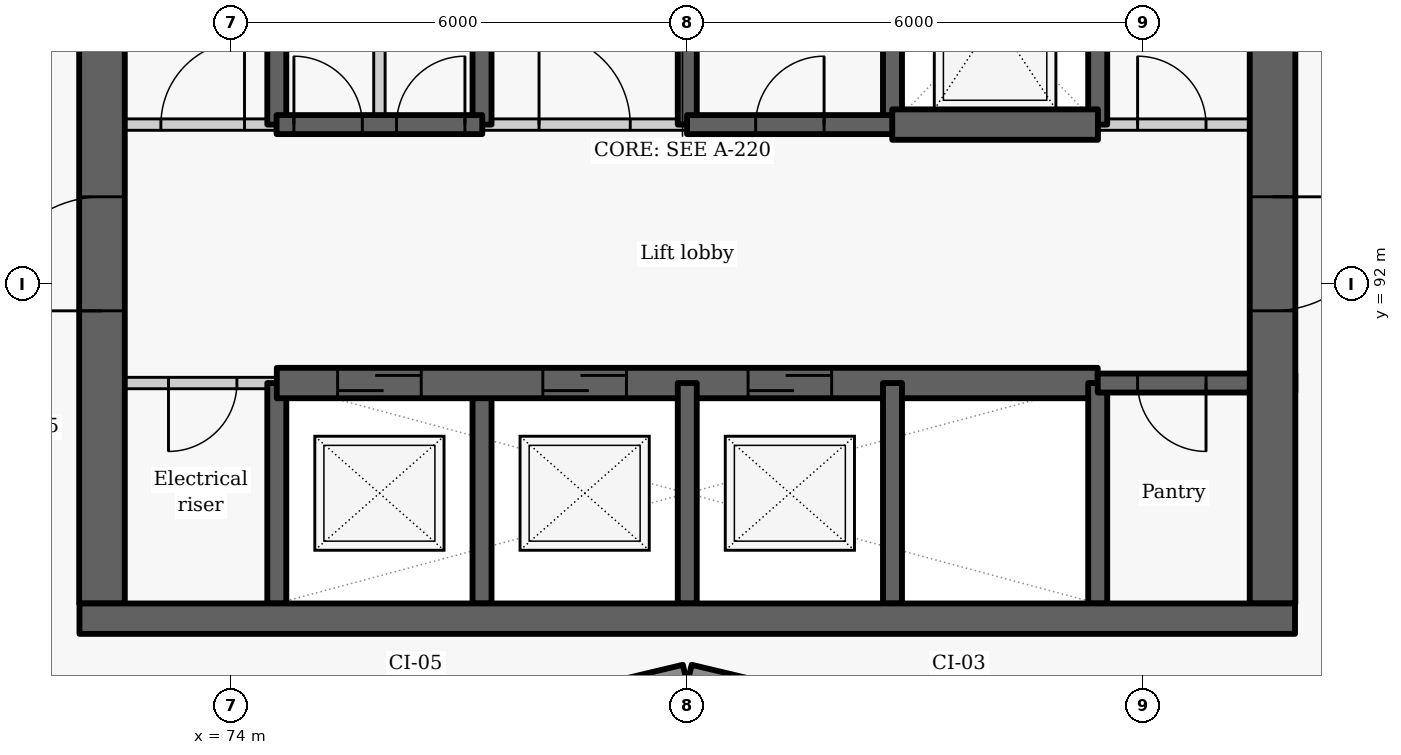
"""IFC4 building model, lengths in metres.
Left out: names, types, materials, properties, quantities, classifications, styles, units other than length and angle.
Written with IfcOpenShell. Run it as: python <this file> out.ifc"""

import sys

from ifc_helpers import new_model, si_unit, direction, frame, frame_2d, origin, place, context, subcontext, project, spatial, rectangle, extrude, element, fill, save


model = new_model("IFC4")
c1 = context("Model", 3, precision=1e-05, world=origin(), true_north=direction((0.0, 1.0)))
c2 = subcontext(c1, "Body", "Model", "MODEL_VIEW")
j1 = project(units=[si_unit("LENGTHUNIT", "METRE"), si_unit("PLANEANGLEUNIT", "RADIAN")], contexts=[c1])
p1 = place(None, origin())
s1 = spatial("IfcSite", under=j1, at=p1, CompositionType="ELEMENT")
p2 = place(p1, origin())
s2 = spatial("IfcBuilding", under=s1, at=p2, CompositionType="ELEMENT")
p3 = place(p2, frame((0.0, 0.0, 107.4)))
s3 = spatial("IfcBuildingStorey", under=s2, at=p3, CompositionType="ELEMENT", Elevation=107.4)
for number, where, z_axis, x_axis in (
    (1, (76.814, 86.119, 0.0), (0.0, 0.0, 1.0), (0.973, 0.232, 0.0)),
    (2, (80.029, 86.872, 0.0), (0.0, 0.0, 1.0), (0.973, -0.232, 0.0)),
):
    element("IfcWall", number, at=place(p3, frame(where, z_axis=z_axis, x_axis=x_axis)), inside=s3, PredefinedType="SOLIDWALL", context=c2, shape_type="SweptSolid", body=[
        extrude(rectangle(XDim=3.246, YDim=0.25, at=frame_2d((1.623, 0.0))), origin(), (0.0, 0.0, 1.0), 2.425),
    ])
p4 = place(p3, frame((74.6, 87.8, -0.275), z_axis=(0.0, 0.0, 1.0), x_axis=(0.0, 1.0, 0.0)))
e3 = element("IfcWall", 3, at=p4, inside=s3, PredefinedType="SHEAR", context=c2, shape_type="SweptSolid", body=[
    extrude(rectangle(XDim=2.9, YDim=0.25, at=frame_2d((1.45, 0.0))), origin(), (0.0, 0.0, 1.0), 3.3),
])
p5 = place(p3, frame((74.6, 94.1, -0.275), z_axis=(0.0, 0.0, 1.0), x_axis=(0.0, 1.0, 0.0)))
e4 = element("IfcWall", 4, at=p5, inside=s3, PredefinedType="SHEAR", context=c2, shape_type="SweptSolid", body=[
    extrude(rectangle(XDim=2.8, YDim=0.25, at=frame_2d((1.4, 0.0))), origin(), (0.0, 0.0, 1.0), 3.3),
])
p6 = place(p3, frame((74.6, 90.7, 0.0), z_axis=(0.0, 0.0, 1.0), x_axis=(-1.0, 0.0, 0.0)))
e5 = element("IfcWall", 5, at=p6, inside=s3, PredefinedType="PARTITIONING", context=c2, shape_type="SweptSolid", body=[
    extrude(rectangle(XDim=2.6, YDim=0.15, at=frame_2d((1.3, 0.0))), origin(), (0.0, 0.0, 1.0), 3.025),
])
p7 = place(p6, frame((0.525, 0.0, 0.0)))
e6 = element("IfcOpeningElement", 6, at=p7, cuts=e5, PredefinedType="OPENING", context=c2, shape_type="SweptSolid", body=[
    extrude(rectangle(XDim=0.9, YDim=2.1, at=frame_2d((0.45, 1.05))), frame((0.0, 0.085, 0.0), z_axis=(0.0, -1.0, 0.0), x_axis=(1.0, 0.0, 0.0)), (0.0, 0.0, 1.0), 0.17),
])
p8 = place(p3, frame((72.3, 87.8, -0.275), z_axis=(0.0, 0.0, 1.0), x_axis=(0.0, 1.0, 0.0)))
e7 = element("IfcWall", 7, at=p8, inside=s3, PredefinedType="SHEAR", context=c2, shape_type="SweptSolid", body=[
    extrude(rectangle(XDim=9.1, YDim=0.6, at=frame_2d((4.55, 0.0))), origin(), (0.0, 0.0, 1.0), 3.3),
])
p9 = place(p8, frame((3.85, 0.0, 0.275)))
e8 = element("IfcOpeningElement", 8, at=p9, cuts=e7, PredefinedType="OPENING", context=c2, shape_type="SweptSolid", body=[
    extrude(rectangle(XDim=1.5, YDim=2.1, at=frame_2d((0.75, 1.05))), frame((0.0, 0.31, 0.0), z_axis=(0.0, -1.0, 0.0), x_axis=(1.0, 0.0, 0.0)), (0.0, 0.0, 1.0), 0.62),
])
p10 = place(p3, frame((77.3, 87.8, -0.275), z_axis=(0.0, 0.0, 1.0), x_axis=(0.0, 1.0, 0.0)))
e9 = element("IfcWall", 9, at=p10, inside=s3, PredefinedType="SHEAR", context=c2, shape_type="SweptSolid", body=[
    extrude(rectangle(XDim=2.9, YDim=0.25, at=frame_2d((1.45, 0.0))), origin(), (0.0, 0.0, 1.0), 3.3),
])
p11 = place(p3, frame((77.3, 94.1, -0.275), z_axis=(0.0, 0.0, 1.0), x_axis=(0.0, 1.0, 0.0)))
e10 = element("IfcWall", 10, at=p11, inside=s3, PredefinedType="SHEAR", context=c2, shape_type="SweptSolid", body=[
    extrude(rectangle(XDim=2.8, YDim=0.25, at=frame_2d((1.4, 0.0))), origin(), (0.0, 0.0, 1.0), 3.3),
])
p12 = place(p3, frame((74.6, 90.7, -0.275), z_axis=(0.0, 0.0, 1.0), x_axis=(1.0, 0.0, 0.0)))
e11 = element("IfcWall", 11, at=p12, inside=s3, PredefinedType="SHEAR", context=c2, shape_type="SweptSolid", body=[
    extrude(rectangle(XDim=10.8, YDim=0.4, at=frame_2d((5.4, 0.0))), origin(), (0.0, 0.0, 1.0), 3.3),
])
p13 = place(p12, frame((0.8, 0.0, 0.275)))
e12 = element("IfcOpeningElement", 12, at=p13, cuts=e11, PredefinedType="OPENING", context=c2, shape_type="SweptSolid", body=[
    extrude(rectangle(XDim=1.1, YDim=2.1, at=frame_2d((0.55, 1.05))), frame((0.0, 0.21, 0.0), z_axis=(0.0, -1.0, 0.0), x_axis=(1.0, 0.0, 0.0)), (0.0, 0.0, 1.0), 0.42),
])
p14 = place(p12, frame((3.5, 0.0, 0.275)))
e13 = element("IfcOpeningElement", 13, at=p14, cuts=e11, PredefinedType="OPENING", context=c2, shape_type="SweptSolid", body=[
    extrude(rectangle(XDim=1.1, YDim=2.1, at=frame_2d((0.55, 1.05))), frame((0.0, 0.21, 0.0), z_axis=(0.0, -1.0, 0.0), x_axis=(1.0, 0.0, 0.0)), (0.0, 0.0, 1.0), 0.42),
])
p15 = place(p12, frame((6.2, 0.0, 0.275)))
e14 = element("IfcOpeningElement", 14, at=p15, cuts=e11, PredefinedType="OPENING", context=c2, shape_type="SweptSolid", body=[
    extrude(rectangle(XDim=1.1, YDim=2.1, at=frame_2d((0.55, 1.05))), frame((0.0, 0.21, 0.0), z_axis=(0.0, -1.0, 0.0), x_axis=(1.0, 0.0, 0.0)), (0.0, 0.0, 1.0), 0.42),
])
p16 = place(p3, frame((80.0, 87.8, -0.275), z_axis=(0.0, 0.0, 1.0), x_axis=(0.0, 1.0, 0.0)))
e15 = element("IfcWall", 15, at=p16, inside=s3, PredefinedType="SHEAR", context=c2, shape_type="SweptSolid", body=[
    extrude(rectangle(XDim=2.9, YDim=0.25, at=frame_2d((1.45, 0.0))), origin(), (0.0, 0.0, 1.0), 3.3),
])
p17 = place(p3, frame((80.0, 94.1, -0.275), z_axis=(0.0, 0.0, 1.0), x_axis=(0.0, 1.0, 0.0)))
e16 = element("IfcWall", 16, at=p17, inside=s3, PredefinedType="SHEAR", context=c2, shape_type="SweptSolid", body=[
    extrude(rectangle(XDim=2.8, YDim=0.25, at=frame_2d((1.4, 0.0))), origin(), (0.0, 0.0, 1.0), 3.3),
])
p18 = place(p3, frame((82.7, 87.8, -0.275), z_axis=(0.0, 0.0, 1.0), x_axis=(0.0, 1.0, 0.0)))
e17 = element("IfcWall", 17, at=p18, inside=s3, PredefinedType="SHEAR", context=c2, shape_type="SweptSolid", body=[
    extrude(rectangle(XDim=2.9, YDim=0.25, at=frame_2d((1.45, 0.0))), origin(), (0.0, 0.0, 1.0), 3.3),
])
p19 = place(p3, frame((82.7, 94.1, -0.275), z_axis=(0.0, 0.0, 1.0), x_axis=(0.0, 1.0, 0.0)))
e18 = element("IfcWall", 18, at=p19, inside=s3, PredefinedType="SHEAR", context=c2, shape_type="SweptSolid", body=[
    extrude(rectangle(XDim=2.8, YDim=0.25, at=frame_2d((1.4, 0.0))), origin(), (0.0, 0.0, 1.0), 3.3),
])
p20 = place(p3, frame((85.4, 87.8, -0.275), z_axis=(0.0, 0.0, 1.0), x_axis=(0.0, 1.0, 0.0)))
e19 = element("IfcWall", 19, at=p20, inside=s3, PredefinedType="SHEAR", context=c2, shape_type="SweptSolid", body=[
    extrude(rectangle(XDim=2.9, YDim=0.25, at=frame_2d((1.45, 0.0))), origin(), (0.0, 0.0, 1.0), 3.3),
])
p21 = place(p3, frame((85.4, 94.1, -0.275), z_axis=(0.0, 0.0, 1.0), x_axis=(0.0, 1.0, 0.0)))
e20 = element("IfcWall", 20, at=p21, inside=s3, PredefinedType="SHEAR", context=c2, shape_type="SweptSolid", body=[
    extrude(rectangle(XDim=2.8, YDim=0.25, at=frame_2d((1.4, 0.0))), origin(), (0.0, 0.0, 1.0), 3.3),
])
p22 = place(p3, frame((88.0, 90.7, -0.275), z_axis=(0.0, 0.0, 1.0), x_axis=(-1.0, 0.0, 0.0)))
e21 = element("IfcWall", 21, at=p22, inside=s3, PredefinedType="SHEAR", context=c2, shape_type="SweptSolid", body=[
    extrude(rectangle(XDim=2.6, YDim=0.25, at=frame_2d((1.3, 0.0))), origin(), (0.0, 0.0, 1.0), 3.3),
])
p23 = place(p22, frame((1.175, 0.0, 0.275)))
e22 = element("IfcOpeningElement", 22, at=p23, cuts=e21, PredefinedType="OPENING", context=c2, shape_type="SweptSolid", body=[
    extrude(rectangle(XDim=0.9, YDim=2.1, at=frame_2d((0.45, 1.05))), frame((0.0, 0.135, 0.0), z_axis=(0.0, -1.0, 0.0), x_axis=(1.0, 0.0, 0.0)), (0.0, 0.0, 1.0), 0.27),
])
p24 = place(p3, frame((87.7, 103.4, -0.275), z_axis=(0.0, 0.0, 1.0), x_axis=(0.0, -1.0, 0.0)))
e23 = element("IfcWall", 23, at=p24, inside=s3, PredefinedType="SHEAR", context=c2, shape_type="SweptSolid", body=[
    extrude(rectangle(XDim=15.6, YDim=0.6, at=frame_2d((7.8, 0.0))), origin(), (0.0, 0.0, 1.0), 3.3),
])
p25 = place(p24, frame((10.25, 0.0, 0.275)))
e24 = element("IfcOpeningElement", 24, at=p25, cuts=e23, PredefinedType="OPENING", context=c2, shape_type="SweptSolid", body=[
    extrude(rectangle(XDim=1.5, YDim=2.1, at=frame_2d((0.75, 1.05))), frame((0.0, 0.31, 0.0), z_axis=(0.0, -1.0, 0.0), x_axis=(1.0, 0.0, 0.0)), (0.0, 0.0, 1.0), 0.62),
])
p26 = place(p24, frame((2.7, 0.0, 0.275)))
e25 = element("IfcOpeningElement", 25, at=p26, cuts=e23, PredefinedType="OPENING", context=c2, shape_type="SweptSolid", body=[
    extrude(rectangle(XDim=1.1, YDim=2.1, at=frame_2d((0.55, 1.05))), frame((0.0, 0.31, 0.0), z_axis=(0.0, -1.0, 0.0), x_axis=(1.0, 0.0, 0.0)), (0.0, 0.0, 1.0), 0.62),
])
p27 = place(p3, frame((72.0, 94.1, 0.0), z_axis=(0.0, 0.0, 1.0), x_axis=(1.0, 0.0, 0.0)))
e26 = element("IfcWall", 26, at=p27, inside=s3, PredefinedType="PARTITIONING", context=c2, shape_type="SweptSolid", body=[
    extrude(rectangle(XDim=2.603, YDim=0.15, at=frame_2d((1.302, 0.0))), origin(), (0.0, 0.0, 1.0), 3.025),
])
p28 = place(p27, frame((1.075, 0.0, 0.0)))
e27 = element("IfcOpeningElement", 27, at=p28, cuts=e26, PredefinedType="OPENING", context=c2, shape_type="SweptSolid", body=[
    extrude(rectangle(XDim=1.1, YDim=2.1, at=frame_2d((0.55, 1.05))), frame((0.0, 0.085, 0.0), z_axis=(0.0, -1.0, 0.0), x_axis=(1.0, 0.0, 0.0)), (0.0, 0.0, 1.0), 0.17),
])
p29 = place(p3, frame((77.297, 94.1, 0.0), z_axis=(0.0, 0.0, 1.0), x_axis=(1.0, 0.0, 0.0)))
e28 = element("IfcWall", 28, at=p29, inside=s3, PredefinedType="PARTITIONING", context=c2, shape_type="SweptSolid", body=[
    extrude(rectangle(XDim=2.706, YDim=0.15, at=frame_2d((1.353, 0.0))), origin(), (0.0, 0.0, 1.0), 3.025),
])
p30 = place(p29, frame((0.753, 0.0, 0.0)))
e29 = element("IfcOpeningElement", 29, at=p30, cuts=e28, PredefinedType="OPENING", context=c2, shape_type="SweptSolid", body=[
    extrude(rectangle(XDim=1.2, YDim=2.1, at=frame_2d((0.6, 1.05))), frame((0.0, 0.085, 0.0), z_axis=(0.0, -1.0, 0.0), x_axis=(1.0, 0.0, 0.0)), (0.0, 0.0, 1.0), 0.17),
])
p31 = place(p3, frame((85.397, 94.1, 0.0), z_axis=(0.0, 0.0, 1.0), x_axis=(1.0, 0.0, 0.0)))
e30 = element("IfcWall", 30, at=p31, inside=s3, PredefinedType="PARTITIONING", context=c2, shape_type="SweptSolid", body=[
    extrude(rectangle(XDim=2.603, YDim=0.15, at=frame_2d((1.302, 0.0))), origin(), (0.0, 0.0, 1.0), 3.025),
])
p32 = place(p31, frame((0.528, 0.0, 0.0)))
e31 = element("IfcOpeningElement", 31, at=p32, cuts=e30, PredefinedType="OPENING", context=c2, shape_type="SweptSolid", body=[
    extrude(rectangle(XDim=0.9, YDim=2.1, at=frame_2d((0.45, 1.05))), frame((0.0, 0.085, 0.0), z_axis=(0.0, -1.0, 0.0), x_axis=(1.0, 0.0, 0.0)), (0.0, 0.0, 1.0), 0.17),
])
p33 = place(p3, frame((74.597, 94.1, -0.275), z_axis=(0.0, 0.0, 1.0), x_axis=(1.0, 0.0, 0.0)))
e32 = element("IfcWall", 32, at=p33, inside=s3, PredefinedType="SHEAR", context=c2, shape_type="SweptSolid", body=[
    extrude(rectangle(XDim=2.706, YDim=0.25, at=frame_2d((1.353, 0.0))), origin(), (0.0, 0.0, 1.0), 3.3),
])
p34 = place(p33, frame((0.228, 0.0, 0.275)))
e33 = element("IfcOpeningElement", 33, at=p34, cuts=e32, PredefinedType="OPENING", context=c2, shape_type="SweptSolid", body=[
    extrude(rectangle(XDim=0.9, YDim=2.1, at=frame_2d((0.45, 1.05))), frame((0.0, 0.135, 0.0), z_axis=(0.0, -1.0, 0.0), x_axis=(1.0, 0.0, 0.0)), (0.0, 0.0, 1.0), 0.27),
])
p35 = place(p33, frame((1.578, 0.0, 0.275)))
e34 = element("IfcOpeningElement", 34, at=p35, cuts=e32, PredefinedType="OPENING", context=c2, shape_type="SweptSolid", body=[
    extrude(rectangle(XDim=0.9, YDim=2.1, at=frame_2d((0.45, 1.05))), frame((0.0, 0.135, 0.0), z_axis=(0.0, -1.0, 0.0), x_axis=(1.0, 0.0, 0.0)), (0.0, 0.0, 1.0), 0.27),
])
p36 = place(p3, frame((79.997, 94.1, -0.275), z_axis=(0.0, 0.0, 1.0), x_axis=(1.0, 0.0, 0.0)))
e35 = element("IfcWall", 35, at=p36, inside=s3, PredefinedType="SHEAR", context=c2, shape_type="SweptSolid", body=[
    extrude(rectangle(XDim=2.706, YDim=0.25, at=frame_2d((1.353, 0.0))), origin(), (0.0, 0.0, 1.0), 3.3),
])
p37 = place(p36, frame((0.903, 0.0, 0.275)))
e36 = element("IfcOpeningElement", 36, at=p37, cuts=e35, PredefinedType="OPENING", context=c2, shape_type="SweptSolid", body=[
    extrude(rectangle(XDim=0.9, YDim=2.1, at=frame_2d((0.45, 1.05))), frame((0.0, 0.135, 0.0), z_axis=(0.0, -1.0, 0.0), x_axis=(1.0, 0.0, 0.0)), (0.0, 0.0, 1.0), 0.27),
])
p38 = place(p3, frame((82.697, 94.1, -0.275), z_axis=(0.0, 0.0, 1.0), x_axis=(1.0, 0.0, 0.0)))
e37 = element("IfcWall", 37, at=p38, inside=s3, PredefinedType="SHEAR", context=c2, shape_type="SweptSolid", body=[
    extrude(rectangle(XDim=2.706, YDim=0.4, at=frame_2d((1.353, 0.0))), origin(), (0.0, 0.0, 1.0), 3.3),
])
p39 = place(p3, frame((75.95, 94.1, 0.0), z_axis=(0.0, 0.0, 1.0), x_axis=(0.0, 1.0, 0.0)))
e38 = element("IfcWall", 38, at=p39, inside=s3, PredefinedType="PARTITIONING", context=c2, shape_type="SweptSolid", body=[
    extrude(rectangle(XDim=2.8, YDim=0.15, at=frame_2d((1.4, 0.0))), origin(), (0.0, 0.0, 1.0), 3.025),
])
p40 = place(p3, frame((72.004, 87.6, -0.275), z_axis=(0.0, 0.0, 1.0), x_axis=(1.0, 0.0, 0.0)))
e39 = element("IfcWall", 39, at=p40, inside=s3, PredefinedType="SHEAR", context=c2, shape_type="SweptSolid", body=[
    extrude(rectangle(XDim=15.992, YDim=0.4, at=frame_2d((7.996, 0.0))), origin(), (0.0, 0.0, 1.0), 3.3),
])
p41 = place(p7, origin())
e40 = element("IfcDoor", 40, at=p41, inside=s3, OperationType="SINGLE_SWING_RIGHT", PredefinedType="DOOR", context=c2, shape_type="SweptSolid", body=[
    extrude(rectangle(XDim=0.9, YDim=2.1, at=frame_2d((0.45, 1.05))), frame((0.0, 0.025, 0.0), z_axis=(0.0, -1.0, 0.0), x_axis=(1.0, 0.0, 0.0)), (0.0, 0.0, 1.0), 0.05),
])
fill(e6, e40)
p42 = place(p13, origin())
e41 = element("IfcDoor", 41, at=p42, inside=s3, OperationType="SLIDING_TO_LEFT", PredefinedType="DOOR", context=c2, shape_type="SweptSolid", body=[
    extrude(rectangle(XDim=1.1, YDim=2.1, at=frame_2d((0.55, 1.05))), frame((0.0, 0.025, 0.0), z_axis=(0.0, -1.0, 0.0), x_axis=(1.0, 0.0, 0.0)), (0.0, 0.0, 1.0), 0.05),
])
fill(e12, e41)
p43 = place(p14, origin())
e42 = element("IfcDoor", 42, at=p43, inside=s3, OperationType="SLIDING_TO_LEFT", PredefinedType="DOOR", context=c2, shape_type="SweptSolid", body=[
    extrude(rectangle(XDim=1.1, YDim=2.1, at=frame_2d((0.55, 1.05))), frame((0.0, 0.025, 0.0), z_axis=(0.0, -1.0, 0.0), x_axis=(1.0, 0.0, 0.0)), (0.0, 0.0, 1.0), 0.05),
])
fill(e13, e42)
p44 = place(p15, origin())
e43 = element("IfcDoor", 43, at=p44, inside=s3, OperationType="SLIDING_TO_LEFT", PredefinedType="DOOR", context=c2, shape_type="SweptSolid", body=[
    extrude(rectangle(XDim=1.1, YDim=2.1, at=frame_2d((0.55, 1.05))), frame((0.0, 0.025, 0.0), z_axis=(0.0, -1.0, 0.0), x_axis=(1.0, 0.0, 0.0)), (0.0, 0.0, 1.0), 0.05),
])
fill(e14, e43)
p45 = place(p23, origin())
e44 = element("IfcDoor", 44, at=p45, inside=s3, OperationType="SINGLE_SWING_LEFT", PredefinedType="DOOR", context=c2, shape_type="SweptSolid", body=[
    extrude(rectangle(XDim=0.9, YDim=2.1, at=frame_2d((0.45, 1.05))), frame((0.0, 0.025, 0.0), z_axis=(0.0, -1.0, 0.0), x_axis=(1.0, 0.0, 0.0)), (0.0, 0.0, 1.0), 0.05),
])
fill(e22, e44)
p46 = place(p28, origin())
e45 = element("IfcDoor", 45, at=p46, inside=s3, OperationType="SINGLE_SWING_RIGHT", PredefinedType="DOOR", context=c2, shape_type="SweptSolid", body=[
    extrude(rectangle(XDim=1.1, YDim=2.1, at=frame_2d((0.55, 1.05))), frame((0.0, 0.025, 0.0), z_axis=(0.0, -1.0, 0.0), x_axis=(1.0, 0.0, 0.0)), (0.0, 0.0, 1.0), 0.05),
])
fill(e27, e45)
p47 = place(p34, origin())
e46 = element("IfcDoor", 46, at=p47, inside=s3, OperationType="SINGLE_SWING_LEFT", PredefinedType="DOOR", context=c2, shape_type="SweptSolid", body=[
    extrude(rectangle(XDim=0.9, YDim=2.1, at=frame_2d((0.45, 1.05))), frame((0.0, 0.025, 0.0), z_axis=(0.0, -1.0, 0.0), x_axis=(1.0, 0.0, 0.0)), (0.0, 0.0, 1.0), 0.05),
])
fill(e33, e46)
p48 = place(p35, origin())
e47 = element("IfcDoor", 47, at=p48, inside=s3, OperationType="SINGLE_SWING_RIGHT", PredefinedType="DOOR", context=c2, shape_type="SweptSolid", body=[
    extrude(rectangle(XDim=0.9, YDim=2.1, at=frame_2d((0.45, 1.05))), frame((0.0, 0.025, 0.0), z_axis=(0.0, -1.0, 0.0), x_axis=(1.0, 0.0, 0.0)), (0.0, 0.0, 1.0), 0.05),
])
fill(e34, e47)
p49 = place(p30, origin())
e48 = element("IfcDoor", 48, at=p49, inside=s3, OperationType="DOUBLE_DOOR_SINGLE_SWING", PredefinedType="DOOR", context=c2, shape_type="SweptSolid", body=[
    extrude(rectangle(XDim=1.2, YDim=2.1, at=frame_2d((0.6, 1.05))), frame((0.0, 0.025, 0.0), z_axis=(0.0, -1.0, 0.0), x_axis=(1.0, 0.0, 0.0)), (0.0, 0.0, 1.0), 0.05),
])
fill(e29, e48)
p50 = place(p37, origin())
e49 = element("IfcDoor", 49, at=p50, inside=s3, OperationType="SINGLE_SWING_RIGHT", PredefinedType="DOOR", context=c2, shape_type="SweptSolid", body=[
    extrude(rectangle(XDim=0.9, YDim=2.1, at=frame_2d((0.45, 1.05))), frame((0.0, 0.025, 0.0), z_axis=(0.0, -1.0, 0.0), x_axis=(1.0, 0.0, 0.0)), (0.0, 0.0, 1.0), 0.05),
])
fill(e36, e49)
p51 = place(p32, origin())
e50 = element("IfcDoor", 50, at=p51, inside=s3, OperationType="SINGLE_SWING_LEFT", PredefinedType="DOOR", context=c2, shape_type="SweptSolid", body=[
    extrude(rectangle(XDim=0.9, YDim=2.1, at=frame_2d((0.45, 1.05))), frame((0.0, 0.025, 0.0), z_axis=(0.0, -1.0, 0.0), x_axis=(1.0, 0.0, 0.0)), (0.0, 0.0, 1.0), 0.05),
])
fill(e31, e50)
p52 = place(p25, origin())
e51 = element("IfcDoor", 51, at=p52, inside=s3, OperationType="DOUBLE_DOOR_SINGLE_SWING", PredefinedType="DOOR", context=c2, shape_type="SweptSolid", body=[
    extrude(rectangle(XDim=1.5, YDim=2.1, at=frame_2d((0.75, 1.05))), frame((0.0, 0.025, 0.0), z_axis=(0.0, -1.0, 0.0), x_axis=(1.0, 0.0, 0.0)), (0.0, 0.0, 1.0), 0.05),
])
fill(e24, e51)
p53 = place(p9, origin())
e52 = element("IfcDoor", 52, at=p53, inside=s3, OperationType="DOUBLE_DOOR_SINGLE_SWING", PredefinedType="DOOR", context=c2, shape_type="SweptSolid", body=[
    extrude(rectangle(XDim=1.5, YDim=2.1, at=frame_2d((0.75, 1.05))), frame((0.0, 0.025, 0.0), z_axis=(0.0, -1.0, 0.0), x_axis=(1.0, 0.0, 0.0)), (0.0, 0.0, 1.0), 0.05),
])
fill(e8, e52)
save(model, sys.argv[1])
